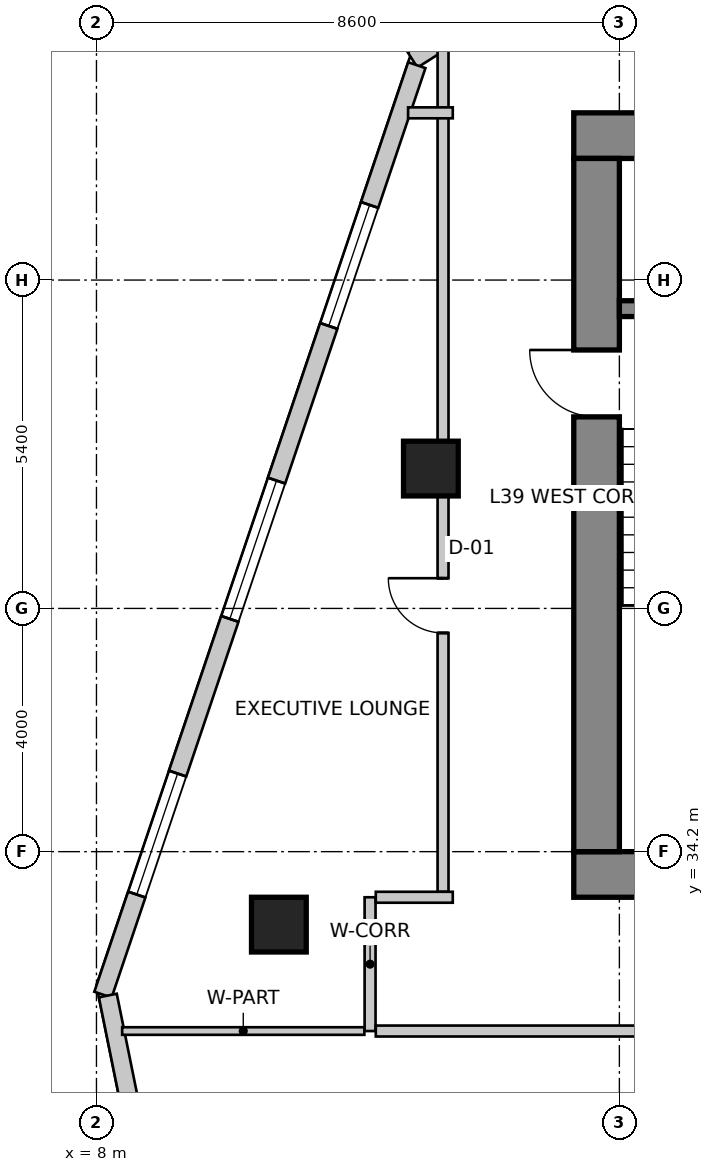
"""IFC4 building model, lengths in metres.
Left out: names, types, materials, properties, quantities, classifications, styles, units other than length and angle.
Written with IfcOpenShell. Run it as: python <this file> out.ifc"""

import sys

from ifc_helpers import new_model, si_unit, direction, frame, frame_2d, origin, origin_2d, place, context, subcontext, project, spatial, rectangle, extrude, source, transform, mapped, element, fill, save


model = new_model("IFC4")
c1 = context("Model", 3, precision=1e-05, world=origin(), true_north=direction((0.0, 1.0)))
c2 = subcontext(c1, "Body", "Model", "MODEL_VIEW")
j1 = project(units=[si_unit("LENGTHUNIT", "METRE"), si_unit("PLANEANGLEUNIT", "RADIAN")], contexts=[c1])
p1 = place(None, origin())
s1 = spatial("IfcSite", under=j1, at=p1, CompositionType="ELEMENT")
p2 = place(p1, origin())
s2 = spatial("IfcBuilding", under=s1, at=p2, CompositionType="ELEMENT")
p3 = place(p2, frame((0.0, 0.0, 157.4)))
s3 = spatial("IfcBuildingStorey", under=s2, at=p3, CompositionType="ELEMENT", Elevation=157.4)
p4 = place(p3, frame((15.85, 45.975, 0.0), z_axis=(0.0, 0.0, 1.0), x_axis=(1.0, 0.0, 0.0)))
e1 = element("IfcWall", 1, at=p4, inside=s3, PredefinedType="SHEAR", context=c2, shape_type="SweptSolid", body=[
    extrude(rectangle(XDim=15.9, YDim=0.75, at=frame_2d((7.95, 0.0))), origin(), (0.0, 0.0, 1.0), 3.6),
])
p5 = place(p3, frame((15.85, 33.825, 0.0), z_axis=(0.0, 0.0, 1.0), x_axis=(1.0, 0.0, 0.0)))
e2 = element("IfcWall", 2, at=p5, inside=s3, PredefinedType="SHEAR", context=c2, shape_type="SweptSolid", body=[
    extrude(rectangle(XDim=15.9, YDim=0.75, at=frame_2d((7.95, 0.0))), origin(), (0.0, 0.0, 1.0), 3.6),
])
m1 = source(origin(), c2, "Body", "SweptSolid", [
    extrude(rectangle(XDim=1.3, YDim=2.15, at=frame_2d((0.65, 1.075))), frame((0.0, 0.385, 0.0), z_axis=(0.0, -1.0, 0.0), x_axis=(1.0, 0.0, 0.0)), (0.0, 0.0, 1.0), 0.77),
])
p6 = place(p5, frame((10.08, 0.0, 0.0)))
e3 = element("IfcOpeningElement", 3, at=p6, cuts=e2, PredefinedType="OPENING", context=c2, shape_type="MappedRepresentation", body=[
    mapped(m1, transform((0.0, 0.0, 0.0), scale=1.0)),
])
p7 = place(p3, frame((16.225, 34.2, 0.0), z_axis=(0.0, 0.0, 1.0), x_axis=(0.0, 1.0, 0.0)))
e4 = element("IfcWall", 4, at=p7, inside=s3, PredefinedType="SHEAR", context=c2, shape_type="SweptSolid", body=[
    extrude(rectangle(XDim=11.4, YDim=0.75, at=frame_2d((5.7, 0.0))), origin(), (0.0, 0.0, 1.0), 3.6),
])
m2 = source(origin(), c2, "Body", "SweptSolid", [
    extrude(rectangle(XDim=1.1, YDim=2.15, at=frame_2d((0.55, 1.075))), frame((0.0, 0.385, 0.0), z_axis=(0.0, -1.0, 0.0), x_axis=(1.0, 0.0, 0.0)), (0.0, 0.0, 1.0), 0.77),
])
p8 = place(p7, frame((7.15, 0.0, 0.0)))
e5 = element("IfcOpeningElement", 5, at=p8, cuts=e4, PredefinedType="OPENING", context=c2, shape_type="MappedRepresentation", body=[
    mapped(m2, transform((0.0, 0.0, 0.0), scale=1.0)),
])
p9 = place(p3, frame((16.6, 43.13, 0.0), z_axis=(0.0, 0.0, 1.0), x_axis=(1.0, 0.0, 0.0)))
e6 = element("IfcWall", 6, at=p9, inside=s3, PredefinedType="SHEAR", context=c2, shape_type="SweptSolid", body=[
    extrude(rectangle(XDim=3.5, YDim=0.26, at=frame_2d((1.75, 0.0))), origin(), (0.0, 0.0, 1.0), 3.6),
])
m3 = source(origin(), c2, "Body", "SweptSolid", [
    extrude(rectangle(XDim=0.9, YDim=0.9, at=origin_2d()), origin(), (0.0, 0.0, 1.0), 3.6),
])
for number, where, z_axis, x_axis in (
    (7, (11.0, 33.0, 0.0), (0.0, 0.0, 1.0), (1.0, 0.0, 0.0)),
    (8, (13.5, 40.5, 0.0), (0.0, 0.0, 1.0), (1.0, 0.0, 0.0)),
):
    element("IfcColumn", number, at=place(p3, frame(where, z_axis=z_axis, x_axis=x_axis)), inside=s3, PredefinedType="COLUMN", context=c2, shape_type="MappedRepresentation", body=[
        mapped(m3, transform((0.0, 0.0, 0.0), scale=1.0)),
    ])
p10 = place(p3, frame((21.875, 52.742, 0.0), z_axis=(0.0, 0.0, 1.0), x_axis=(-0.843662465249, -0.536873956092, 0.0)))
e9 = element("IfcWall", 9, at=p10, inside=s3, PredefinedType="SOLIDWALL", context=c2, shape_type="SweptSolid", body=[
    extrude(rectangle(XDim=10.284, YDim=0.3, at=frame_2d((5.142, 0.0))), origin(), (0.0, 0.0, 1.0), 3.35),
])
m4 = source(origin(), c2, "Body", "SweptSolid", [
    extrude(rectangle(XDim=2.4, YDim=2.2, at=frame_2d((1.2, 1.1))), frame((0.0, 0.16, 0.0), z_axis=(0.0, -1.0, 0.0), x_axis=(1.0, 0.0, 0.0)), (0.0, 0.0, 1.0), 0.32),
])
p11 = place(p10, frame((2.656, 0.0, 0.85)))
e10 = element("IfcOpeningElement", 10, at=p11, cuts=e9, PredefinedType="OPENING", context=c2, shape_type="MappedRepresentation", body=[
    mapped(m4, transform((0.0, 0.0, 0.0), scale=1.0)),
])
m5 = source(origin(), c2, "Body", "SweptSolid", [
    extrude(rectangle(XDim=1.5, YDim=1.8, at=frame_2d((0.75, 0.9))), frame((0.0, 0.16, 0.0), z_axis=(0.0, -1.0, 0.0), x_axis=(1.0, 0.0, 0.0)), (0.0, 0.0, 1.0), 0.32),
])
p12 = place(p10, frame((7.937, 0.0, 0.85)))
e11 = element("IfcOpeningElement", 11, at=p12, cuts=e9, PredefinedType="OPENING", context=c2, shape_type="MappedRepresentation", body=[
    mapped(m5, transform((0.0, 0.0, 0.0), scale=1.0)),
])
p13 = place(p3, frame((13.269, 47.134, 0.0), z_axis=(0.0, 0.0, 1.0), x_axis=(-0.319929773322, -0.947441259468, 0.0)))
e12 = element("IfcWall", 12, at=p13, inside=s3, PredefinedType="SOLIDWALL", context=c2, shape_type="SweptSolid", body=[
    extrude(rectangle(XDim=16.134, YDim=0.3, at=frame_2d((8.067, 0.0))), origin(), (0.0, 0.0, 1.0), 3.35),
])
m6 = source(origin(), c2, "Body", "SweptSolid", [
    extrude(rectangle(XDim=2.1, YDim=2.0, at=frame_2d((1.05, 1.0))), frame((0.0, 0.16, 0.0), z_axis=(0.0, -1.0, 0.0), x_axis=(1.0, 0.0, 0.0)), (0.0, 0.0, 1.0), 0.32),
])
p14 = place(p13, frame((2.426, 0.0, 0.85)))
e13 = element("IfcOpeningElement", 13, at=p14, cuts=e12, PredefinedType="OPENING", context=c2, shape_type="MappedRepresentation", body=[
    mapped(m6, transform((0.0, 0.0, 0.0), scale=1.0)),
])
p15 = place(p13, frame((7.211, 0.0, 0.85)))
e14 = element("IfcOpeningElement", 14, at=p15, cuts=e12, PredefinedType="OPENING", context=c2, shape_type="MappedRepresentation", body=[
    mapped(m4, transform((0.0, 0.0, 0.0), scale=1.0)),
])
p16 = place(p13, frame((12.296, 0.0, 0.85)))
e15 = element("IfcOpeningElement", 15, at=p16, cuts=e12, PredefinedType="OPENING", context=c2, shape_type="MappedRepresentation", body=[
    mapped(m6, transform((0.0, 0.0, 0.0), scale=1.0)),
])
p17 = place(p3, frame((8.187, 31.834, 0.0), z_axis=(0.0, 0.0, 1.0), x_axis=(0.198869838988, -0.980025911464, 0.0)))
e16 = element("IfcWall", 16, at=p17, inside=s3, PredefinedType="SOLIDWALL", context=c2, shape_type="SweptSolid", body=[
    extrude(rectangle(XDim=16.363, YDim=0.3, at=frame_2d((8.182, 0.0))), origin(), (0.0, 0.0, 1.0), 3.35),
])
m7 = source(origin(), c2, "Body", "SweptSolid", [
    extrude(rectangle(XDim=1.6, YDim=2.15, at=frame_2d((0.8, 1.075))), frame((0.0, 0.16, 0.0), z_axis=(0.0, -1.0, 0.0), x_axis=(1.0, 0.0, 0.0)), (0.0, 0.0, 1.0), 0.32),
])
p18 = place(p17, frame((9.459, 0.0, 0.0)))
e17 = element("IfcOpeningElement", 17, at=p18, cuts=e16, PredefinedType="OPENING", context=c2, shape_type="MappedRepresentation", body=[
    mapped(m7, transform((0.0, 0.0, 0.0), scale=1.0)),
])
p19 = place(p17, frame((3.809, 0.0, 0.85)))
e18 = element("IfcOpeningElement", 18, at=p19, cuts=e16, PredefinedType="OPENING", context=c2, shape_type="MappedRepresentation", body=[
    mapped(m4, transform((0.0, 0.0, 0.0), scale=1.0)),
])
p20 = place(p17, frame((13.236, 0.0, 0.85)))
e19 = element("IfcOpeningElement", 19, at=p20, cuts=e16, PredefinedType="OPENING", context=c2, shape_type="MappedRepresentation", body=[
    mapped(m4, transform((0.0, 0.0, 0.0), scale=1.0)),
])
p21 = place(p3, frame((12.5, 31.25, 0.0), z_axis=(0.0, 0.0, 1.0), x_axis=(0.0, 1.0, 0.0)))
e20 = element("IfcWall", 20, at=p21, inside=s3, PredefinedType="PARTITIONING", context=c2, shape_type="SweptSolid", body=[
    extrude(rectangle(XDim=2.2, YDim=0.18, at=frame_2d((1.1, 0.0))), origin(), (0.0, 0.0, 1.0), 2.935),
])
p22 = place(p3, frame((12.594, 33.45, 0.0), z_axis=(0.0, 0.0, 1.0), x_axis=(1.0, 0.0, 0.0)))
e21 = element("IfcWall", 21, at=p22, inside=s3, PredefinedType="PARTITIONING", context=c2, shape_type="SweptSolid", body=[
    extrude(rectangle(XDim=1.266, YDim=0.18, at=frame_2d((0.633, 0.0))), origin(), (0.0, 0.0, 1.0), 3.35),
])
p23 = place(p3, frame((26.76, 31.25, 0.0), z_axis=(0.0, 0.0, 1.0), x_axis=(-1.0, 0.0, 0.0)))
e22 = element("IfcWall", 22, at=p23, inside=s3, PredefinedType="PARTITIONING", context=c2, shape_type="SweptSolid", body=[
    extrude(rectangle(XDim=14.166, YDim=0.18, at=frame_2d((7.083, 0.0))), origin(), (0.0, 0.0, 1.0), 2.935),
])
m8 = source(origin(), c2, "Body", "SweptSolid", [
    extrude(rectangle(XDim=1.4, YDim=2.15, at=frame_2d((0.7, 1.075))), frame((0.0, 0.1, 0.0), z_axis=(0.0, -1.0, 0.0), x_axis=(1.0, 0.0, 0.0)), (0.0, 0.0, 1.0), 0.2),
])
p24 = place(p23, frame((6.323, 0.0, 0.0)))
e23 = element("IfcOpeningElement", 23, at=p24, cuts=e22, PredefinedType="OPENING", context=c2, shape_type="MappedRepresentation", body=[
    mapped(m8, transform((0.0, 0.0, 0.0), scale=1.0)),
])
p25 = place(p3, frame((13.7, 33.544, 0.0), z_axis=(0.0, 0.0, 1.0), x_axis=(0.0, 1.0, 0.0)))
e24 = element("IfcWall", 24, at=p25, inside=s3, PredefinedType="PARTITIONING", context=c2, shape_type="SweptSolid", body=[
    extrude(rectangle(XDim=13.86, YDim=0.18, at=frame_2d((6.93, 0.0))), origin(), (0.0, 0.0, 1.0), 2.492),
])
m9 = source(origin(), c2, "Body", "SweptSolid", [
    extrude(rectangle(XDim=0.9, YDim=2.15, at=frame_2d((0.45, 1.075))), frame((0.0, 0.1, 0.0), z_axis=(0.0, -1.0, 0.0), x_axis=(1.0, 0.0, 0.0)), (0.0, 0.0, 1.0), 0.2),
])
p26 = place(p25, frame((4.253, 0.0, 0.0)))
e25 = element("IfcOpeningElement", 25, at=p26, cuts=e24, PredefinedType="OPENING", context=c2, shape_type="MappedRepresentation", body=[
    mapped(m9, transform((0.0, 0.0, 0.0), scale=1.0)),
])
p27 = place(p3, frame((13.86, 46.35, 0.0), z_axis=(0.0, 0.0, 1.0), x_axis=(-1.0, 0.0, 0.0)))
e26 = element("IfcWall", 26, at=p27, inside=s3, PredefinedType="PARTITIONING", context=c2, shape_type="SweptSolid", body=[
    extrude(rectangle(XDim=0.735, YDim=0.18, at=frame_2d((0.367, 0.0))), origin(), (0.0, 0.0, 1.0), 3.35),
])
p28 = place(p3, frame((12.406, 31.25, 0.0), z_axis=(0.0, 0.0, 1.0), x_axis=(-1.0, 0.0, 0.0)))
e27 = element("IfcWall", 27, at=p28, inside=s3, PredefinedType="PARTITIONING", context=c2, shape_type="SweptSolid", body=[
    extrude(rectangle(XDim=3.983, YDim=0.125, at=frame_2d((1.992, 0.0))), origin(), (0.0, 0.0, 1.0), 2.492),
])
m10 = source(origin(), c2, "Body", "SweptSolid", [
    extrude(rectangle(XDim=2.1, YDim=2.0, at=frame_2d((1.05, 1.0))), frame((0.0, -0.015, 0.0), z_axis=(0.0, -1.0, 0.0), x_axis=(1.0, 0.0, 0.0)), (0.0, 0.0, 1.0), 0.06),
])
p29 = place(p14, origin())
e28 = element("IfcWindow", 28, at=p29, inside=s3, PartitioningType="SINGLE_PANEL", PredefinedType="WINDOW", context=c2, shape_type="MappedRepresentation", body=[
    mapped(m10, transform((0.0, 0.0, 0.0), scale=1.0)),
])
fill(e13, e28)
m11 = source(origin(), c2, "Body", "SweptSolid", [
    extrude(rectangle(XDim=2.4, YDim=2.2, at=frame_2d((1.2, 1.1))), frame((0.0, -0.015, 0.0), z_axis=(0.0, -1.0, 0.0), x_axis=(1.0, 0.0, 0.0)), (0.0, 0.0, 1.0), 0.06),
])
p30 = place(p15, origin())
e29 = element("IfcWindow", 29, at=p30, inside=s3, PartitioningType="SINGLE_PANEL", PredefinedType="WINDOW", context=c2, shape_type="MappedRepresentation", body=[
    mapped(m11, transform((0.0, 0.0, 0.0), scale=1.0)),
])
fill(e14, e29)
p31 = place(p16, origin())
e30 = element("IfcWindow", 30, at=p31, inside=s3, PartitioningType="SINGLE_PANEL", PredefinedType="WINDOW", context=c2, shape_type="MappedRepresentation", body=[
    mapped(m10, transform((0.0, 0.0, 0.0), scale=1.0)),
])
fill(e15, e30)
m12 = source(origin(), c2, "Body", "SweptSolid", [
    extrude(rectangle(XDim=1.1, YDim=2.15, at=frame_2d((0.55, 1.075))), frame((0.0, 0.025, 0.0), z_axis=(0.0, -1.0, 0.0), x_axis=(1.0, 0.0, 0.0)), (0.0, 0.0, 1.0), 0.05),
])
p32 = place(p8, origin())
e31 = element("IfcDoor", 31, at=p32, inside=s3, OperationType="SINGLE_SWING_RIGHT", PredefinedType="DOOR", context=c2, shape_type="MappedRepresentation", body=[
    mapped(m12, transform((0.0, 0.0, 0.0), scale=1.0)),
])
fill(e5, e31)
m13 = source(origin(), c2, "Body", "SweptSolid", [
    extrude(rectangle(XDim=0.9, YDim=2.15, at=frame_2d((0.45, 1.075))), frame((0.0, 0.025, 0.0), z_axis=(0.0, -1.0, 0.0), x_axis=(1.0, 0.0, 0.0)), (0.0, 0.0, 1.0), 0.05),
])
p33 = place(p26, origin())
e32 = element("IfcDoor", 32, at=p33, inside=s3, OperationType="SINGLE_SWING_RIGHT", PredefinedType="DOOR", context=c2, shape_type="MappedRepresentation", body=[
    mapped(m13, transform((0.0, 0.0, 0.0), scale=1.0)),
])
fill(e25, e32)
save(model, sys.argv[1])
